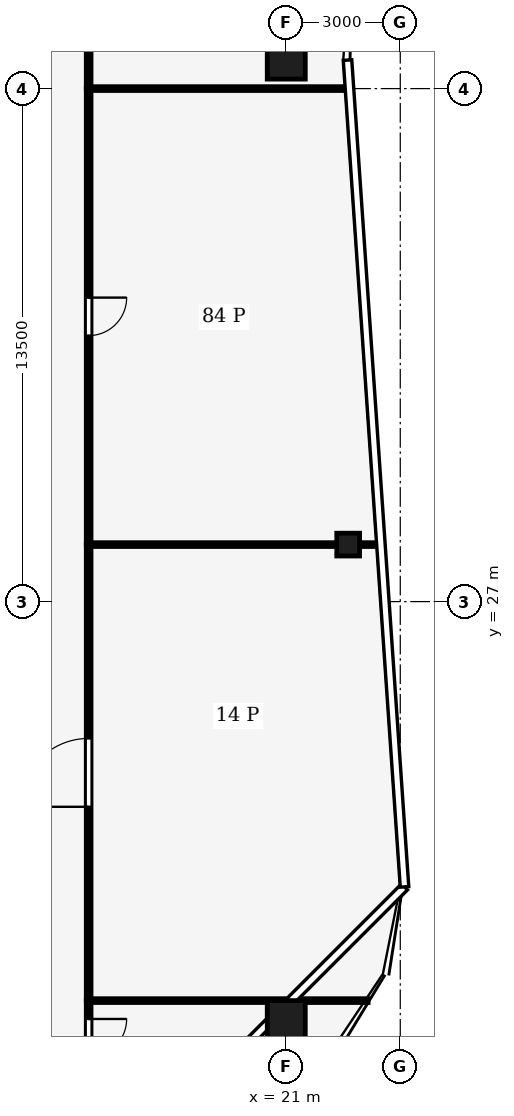
"""IFC4 building model, lengths in metres.
Left out: names, types, materials, properties, quantities, classifications, styles, units other than length and angle.
Written with IfcOpenShell. Run it as: python <this file> out.ifc"""

import sys

from ifc_helpers import new_model, si_unit, direction, frame, frame_2d, origin, origin_2d, place, context, subcontext, project, spatial, rectangle, hollow_rectangle, extrude, element, fill, save


model = new_model("IFC4")
c1 = context("Model", 3, precision=1e-05, world=origin(), true_north=direction((0.0, 1.0)))
c2 = subcontext(c1, "Body", "Model", "MODEL_VIEW")
j1 = project(units=[si_unit("LENGTHUNIT", "METRE"), si_unit("PLANEANGLEUNIT", "RADIAN")], contexts=[c1])
p1 = place(None, origin())
s1 = spatial("IfcSite", under=j1, at=p1, CompositionType="ELEMENT")
p2 = place(p1, origin())
s2 = spatial("IfcBuilding", under=s1, at=p2, CompositionType="ELEMENT")
p3 = place(p2, frame((0.0, 0.0, 258.0)))
s3 = spatial("IfcBuildingStorey", under=s2, at=p3, CompositionType="ELEMENT", Elevation=258.0)
for number, where, z_axis, x_axis in (
    (1, (21.0, 41.25, 0.0), (0.0, 0.0, 1.0), (1.0, 0.0, 0.0)),
    (2, (21.0, 16.0, 0.0), (0.0, 0.0, 1.0), (1.0, 0.0, 0.0)),
):
    element("IfcColumn", number, at=place(p3, frame(where, z_axis=z_axis, x_axis=x_axis)), inside=s3, PredefinedType="COLUMN", context=c2, shape_type="SweptSolid", body=[
        extrude(hollow_rectangle(XDim=1.0, YDim=1.0, WallThickness=0.045, at=origin_2d()), origin(), (0.0, 0.0, 1.0), 4.0),
    ])
p4 = place(p3, frame((22.629, 28.5, 0.0), z_axis=(0.0, 0.0, 1.0), x_axis=(1.0, 0.0, 0.0)))
e3 = element("IfcColumn", 3, at=p4, inside=s3, PredefinedType="COLUMN", context=c2, shape_type="SweptSolid", body=[
    extrude(hollow_rectangle(XDim=0.6, YDim=0.6, WallThickness=0.025, at=origin_2d()), origin(), (0.0, 0.0, 1.0), 4.0),
])
p5 = place(p3, frame((15.8, 16.5, 0.0), z_axis=(0.0, 0.0, 1.0), x_axis=(0.0, -1.0, 0.0)))
e4 = element("IfcWall", 4, at=p5, inside=s3, PredefinedType="PARTITIONING", context=c2, shape_type="SweptSolid", body=[
    extrude(rectangle(XDim=2.897, YDim=0.125, at=frame_2d((1.448, 0.0))), origin(), (0.0, 0.0, 1.0), 3.04),
])
p6 = place(p5, frame((0.483, 0.0, 0.0)))
e5 = element("IfcOpeningElement", 5, at=p6, cuts=e4, PredefinedType="OPENING", context=c2, shape_type="SweptSolid", body=[
    extrude(rectangle(XDim=1.0, YDim=2.1, at=frame_2d((0.5, 1.05))), frame((0.0, 0.073, 0.0), z_axis=(0.0, -1.0, 0.0), x_axis=(1.0, 0.0, 0.0)), (0.0, 0.0, 1.0), 0.145),
])
p7 = place(p3, frame((15.8, 16.5, 0.0), z_axis=(0.0, 0.0, 1.0), x_axis=(0.0, 1.0, 0.0)))
e6 = element("IfcWall", 6, at=p7, inside=s3, PredefinedType="PARTITIONING", context=c2, shape_type="SweptSolid", body=[
    extrude(rectangle(XDim=12.0, YDim=0.125, at=frame_2d((6.0, 0.0))), origin(), (0.0, 0.0, 1.0), 3.14),
])
p8 = place(p7, frame((5.1, 0.0, 0.0)))
e7 = element("IfcOpeningElement", 7, at=p8, cuts=e6, PredefinedType="OPENING", context=c2, shape_type="SweptSolid", body=[
    extrude(rectangle(XDim=1.8, YDim=2.1, at=frame_2d((0.9, 1.05))), frame((0.0, 0.073, 0.0), z_axis=(0.0, -1.0, 0.0), x_axis=(1.0, 0.0, 0.0)), (0.0, 0.0, 1.0), 0.145),
])
p9 = place(p3, frame((15.8, 40.5, 0.0), z_axis=(0.0, 0.0, 1.0), x_axis=(0.0, -1.0, 0.0)))
e8 = element("IfcWall", 8, at=p9, inside=s3, PredefinedType="PARTITIONING", context=c2, shape_type="SweptSolid", body=[
    extrude(rectangle(XDim=12.0, YDim=0.125, at=frame_2d((6.0, 0.0))), origin(), (0.0, 0.0, 1.0), 3.14),
])
p10 = place(p9, frame((5.5, 0.0, 0.0)))
e9 = element("IfcOpeningElement", 9, at=p10, cuts=e8, PredefinedType="OPENING", context=c2, shape_type="SweptSolid", body=[
    extrude(rectangle(XDim=1.0, YDim=2.1, at=frame_2d((0.5, 1.05))), frame((0.0, 0.073, 0.0), z_axis=(0.0, -1.0, 0.0), x_axis=(1.0, 0.0, 0.0)), (0.0, 0.0, 1.0), 0.145),
])
p11 = place(p3, frame((15.8, 40.5, 0.0), z_axis=(0.0, 0.0, 1.0), x_axis=(0.0, 1.0, 0.0)))
e10 = element("IfcWall", 10, at=p11, inside=s3, PredefinedType="PARTITIONING", context=c2, shape_type="SweptSolid", body=[
    extrude(rectangle(XDim=12.0, YDim=0.125, at=frame_2d((6.0, 0.0))), origin(), (0.0, 0.0, 1.0), 3.24),
])
p12 = place(p11, frame((5.1, 0.0, 0.0)))
e11 = element("IfcOpeningElement", 11, at=p12, cuts=e10, PredefinedType="OPENING", context=c2, shape_type="SweptSolid", body=[
    extrude(rectangle(XDim=1.8, YDim=2.1, at=frame_2d((0.9, 1.05))), frame((0.0, 0.073, 0.0), z_axis=(0.0, -1.0, 0.0), x_axis=(1.0, 0.0, 0.0)), (0.0, 0.0, 1.0), 0.145),
])
p13 = place(p3, frame((23.153, 16.5, 0.0), z_axis=(0.0, 0.0, 1.0), x_axis=(-1.0, 0.0, 0.0)))
e12 = element("IfcWall", 12, at=p13, inside=s3, PredefinedType="PARTITIONING", context=c2, shape_type="SweptSolid", body=[
    extrude(rectangle(XDim=7.353, YDim=0.1, at=frame_2d((3.676, 0.0))), origin(), (0.0, 0.0, 1.0), 2.93),
])
p14 = place(p3, frame((23.459, 28.5, 0.0), z_axis=(0.0, 0.0, 1.0), x_axis=(-1.0, 0.0, 0.0)))
e13 = element("IfcWall", 13, at=p14, inside=s3, PredefinedType="PARTITIONING", context=c2, shape_type="SweptSolid", body=[
    extrude(rectangle(XDim=7.659, YDim=0.1, at=frame_2d((3.83, 0.0))), origin(), (0.0, 0.0, 1.0), 3.04),
])
p15 = place(p3, frame((22.632, 40.5, 0.0), z_axis=(0.0, 0.0, 1.0), x_axis=(-1.0, 0.0, 0.0)))
e14 = element("IfcWall", 14, at=p15, inside=s3, PredefinedType="PARTITIONING", context=c2, shape_type="SweptSolid", body=[
    extrude(rectangle(XDim=6.832, YDim=0.1, at=frame_2d((3.416, 0.0))), origin(), (0.0, 0.0, 1.0), 3.04),
])
p16 = place(p6, origin())
e15 = element("IfcDoor", 15, at=p16, inside=s3, OperationType="SINGLE_SWING_LEFT", PredefinedType="DOOR", context=c2, shape_type="SweptSolid", body=[
    extrude(rectangle(XDim=1.0, YDim=2.1, at=frame_2d((0.5, 1.05))), frame((0.0, 0.025, 0.0), z_axis=(0.0, -1.0, 0.0), x_axis=(1.0, 0.0, 0.0)), (0.0, 0.0, 1.0), 0.05),
])
fill(e5, e15)
p17 = place(p8, origin())
e16 = element("IfcDoor", 16, at=p17, inside=s3, OperationType="DOUBLE_DOOR_SINGLE_SWING", PredefinedType="DOOR", context=c2, shape_type="SweptSolid", body=[
    extrude(rectangle(XDim=1.8, YDim=2.1, at=frame_2d((0.9, 1.05))), frame((0.0, 0.025, 0.0), z_axis=(0.0, -1.0, 0.0), x_axis=(1.0, 0.0, 0.0)), (0.0, 0.0, 1.0), 0.05),
])
fill(e7, e16)
p18 = place(p10, origin())
e17 = element("IfcDoor", 17, at=p18, inside=s3, OperationType="SINGLE_SWING_LEFT", PredefinedType="DOOR", context=c2, shape_type="SweptSolid", body=[
    extrude(rectangle(XDim=1.0, YDim=2.1, at=frame_2d((0.5, 1.05))), frame((0.0, 0.025, 0.0), z_axis=(0.0, -1.0, 0.0), x_axis=(1.0, 0.0, 0.0)), (0.0, 0.0, 1.0), 0.05),
])
fill(e9, e17)
save(model, sys.argv[1])
